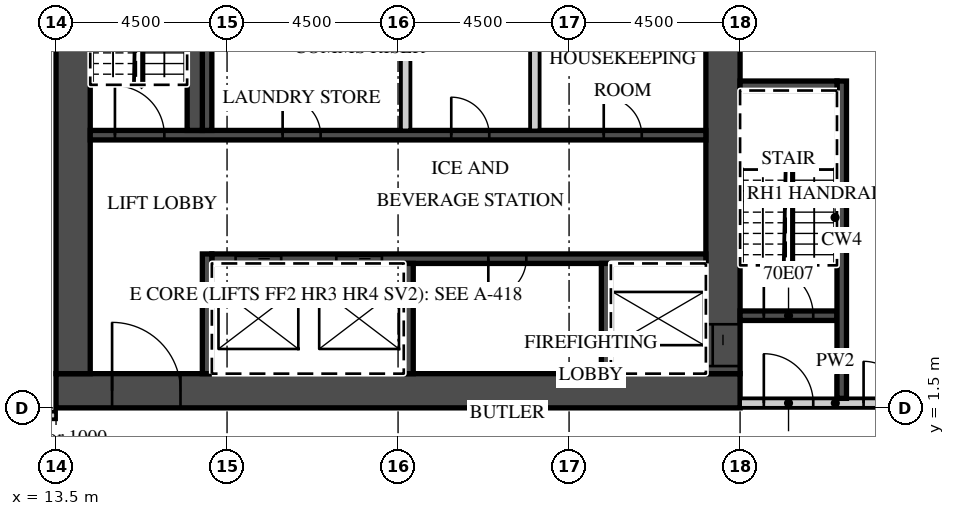
"""IFC4 building model, lengths in metres.
Left out: names, types, materials, properties, quantities, classifications, styles, units other than length and angle.
Written with IfcOpenShell. Run it as: python <this file> out.ifc"""

import sys

from ifc_helpers import new_model, si_unit, direction, frame, frame_2d, origin, place, context, subcontext, project, spatial, rectangle, extrude, element, fill, save


model = new_model("IFC4")
c1 = context("Model", 3, precision=1e-05, world=origin(), true_north=direction((0.0, 1.0)))
c2 = subcontext(c1, "Body", "Model", "MODEL_VIEW")
j1 = project(units=[si_unit("LENGTHUNIT", "METRE"), si_unit("PLANEANGLEUNIT", "RADIAN")], contexts=[c1])
p1 = place(None, origin())
s1 = spatial("IfcSite", under=j1, at=p1, CompositionType="ELEMENT")
p2 = place(p1, origin())
s2 = spatial("IfcBuilding", under=s1, at=p2, CompositionType="ELEMENT")
p3 = place(p2, frame((0.0, 0.0, 281.7)))
s3 = spatial("IfcBuildingStorey", under=s2, at=p3, CompositionType="ELEMENT", Elevation=281.7)
p4 = place(p3, frame((38.132, -12.858, 0.0), z_axis=(0.0, 0.0, 1.0), x_axis=(-0.095847749461, 0.995396006082, 0.0)))
e1 = element("IfcWall", 1, at=p4, inside=s3, PredefinedType="SOLIDWALL", context=c2, shape_type="SweptSolid", body=[
    extrude(rectangle(XDim=32.0, YDim=0.45, at=frame_2d((16.0, 0.0))), origin(), (0.0, 0.0, 1.0), 3.02),
])
p5 = place(p3, frame((-39.909, 1.3, 0.0), z_axis=(0.0, 0.0, 1.0), x_axis=(1.0, 0.0, 0.0)))
e2 = element("IfcWall", 2, at=p5, inside=s3, PredefinedType="PARTITIONING", context=c2, shape_type="SweptSolid", body=[
    extrude(rectangle(XDim=53.409, YDim=0.2, at=frame_2d((26.705, 0.0))), origin(), (0.0, 0.0, 1.0), 3.02),
])
p6 = place(p5, frame((0.15, 0.0, 0.0)))
e3 = element("IfcOpeningElement", 3, at=p6, cuts=e2, PredefinedType="OPENING", context=c2, shape_type="SweptSolid", body=[
    extrude(rectangle(XDim=0.9, YDim=2.1, at=frame_2d((0.45, 1.05))), frame((0.0, 0.11, 0.0), z_axis=(0.0, -1.0, 0.0), x_axis=(1.0, 0.0, 0.0)), (0.0, 0.0, 1.0), 0.22),
])
p7 = place(p5, frame((6.347, 0.0, 0.0)))
e4 = element("IfcOpeningElement", 4, at=p7, cuts=e2, PredefinedType="OPENING", context=c2, shape_type="SweptSolid", body=[
    extrude(rectangle(XDim=1.2, YDim=2.1, at=frame_2d((0.6, 1.05))), frame((0.0, 0.11, 0.0), z_axis=(0.0, -1.0, 0.0), x_axis=(1.0, 0.0, 0.0)), (0.0, 0.0, 1.0), 0.22),
])
p8 = place(p5, frame((15.347, 0.0, 0.0)))
e5 = element("IfcOpeningElement", 5, at=p8, cuts=e2, PredefinedType="OPENING", context=c2, shape_type="SweptSolid", body=[
    extrude(rectangle(XDim=1.2, YDim=2.1, at=frame_2d((0.6, 1.05))), frame((0.0, 0.11, 0.0), z_axis=(0.0, -1.0, 0.0), x_axis=(1.0, 0.0, 0.0)), (0.0, 0.0, 1.0), 0.22),
])
p9 = place(p5, frame((24.346, 0.0, 0.0)))
e6 = element("IfcOpeningElement", 6, at=p9, cuts=e2, PredefinedType="OPENING", context=c2, shape_type="SweptSolid", body=[
    extrude(rectangle(XDim=1.2, YDim=2.1, at=frame_2d((0.6, 1.05))), frame((0.0, 0.11, 0.0), z_axis=(0.0, -1.0, 0.0), x_axis=(1.0, 0.0, 0.0)), (0.0, 0.0, 1.0), 0.22),
])
p10 = place(p5, frame((33.346, 0.0, 0.0)))
e7 = element("IfcOpeningElement", 7, at=p10, cuts=e2, PredefinedType="OPENING", context=c2, shape_type="SweptSolid", body=[
    extrude(rectangle(XDim=1.2, YDim=2.1, at=frame_2d((0.6, 1.05))), frame((0.0, 0.11, 0.0), z_axis=(0.0, -1.0, 0.0), x_axis=(1.0, 0.0, 0.0)), (0.0, 0.0, 1.0), 0.22),
])
p11 = place(p5, frame((42.346, 0.0, 0.0)))
e8 = element("IfcOpeningElement", 8, at=p11, cuts=e2, PredefinedType="OPENING", context=c2, shape_type="SweptSolid", body=[
    extrude(rectangle(XDim=1.2, YDim=2.1, at=frame_2d((0.6, 1.05))), frame((0.0, 0.11, 0.0), z_axis=(0.0, -1.0, 0.0), x_axis=(1.0, 0.0, 0.0)), (0.0, 0.0, 1.0), 0.22),
])
p12 = place(p5, frame((51.834, 0.0, 0.0)))
e9 = element("IfcOpeningElement", 9, at=p12, cuts=e2, PredefinedType="OPENING", context=c2, shape_type="SweptSolid", body=[
    extrude(rectangle(XDim=1.0, YDim=2.1, at=frame_2d((0.5, 1.05))), frame((0.0, 0.11, 0.0), z_axis=(0.0, -1.0, 0.0), x_axis=(1.0, 0.0, 0.0)), (0.0, 0.0, 1.0), 0.22),
])
p13 = place(p3, frame((13.5, 1.95, 0.0), z_axis=(0.0, 0.0, 1.0), x_axis=(1.0, 0.0, 0.0)))
e10 = element("IfcWall", 10, at=p13, inside=s3, PredefinedType="SHEAR", context=c2, shape_type="SweptSolid", body=[
    extrude(rectangle(XDim=18.0, YDim=0.9, at=frame_2d((9.0, 0.0))), origin(), (0.0, 0.0, 1.0), 3.02),
])
p14 = place(p13, frame((1.475, 0.0, 0.0)))
e11 = element("IfcOpeningElement", 11, at=p14, cuts=e10, PredefinedType="OPENING", context=c2, shape_type="SweptSolid", body=[
    extrude(rectangle(XDim=1.8, YDim=2.1, at=frame_2d((0.9, 1.05))), frame((0.0, 0.46, 0.0), z_axis=(0.0, -1.0, 0.0), x_axis=(1.0, 0.0, 0.0)), (0.0, 0.0, 1.0), 0.92),
])
p15 = place(p3, frame((31.05, 2.4, 0.0), z_axis=(0.0, 0.0, 1.0), x_axis=(0.0, 1.0, 0.0)))
e12 = element("IfcWall", 12, at=p15, inside=s3, PredefinedType="SHEAR", context=c2, shape_type="SweptSolid", body=[
    extrude(rectangle(XDim=12.8, YDim=0.9, at=frame_2d((6.4, 0.0))), origin(), (0.0, 0.0, 1.0), 3.02),
])
p16 = place(p15, frame((0.2, 0.0, 0.0)))
e13 = element("IfcOpeningElement", 13, at=p16, cuts=e12, PredefinedType="OPENING", context=c2, shape_type="SweptSolid", body=[
    extrude(rectangle(XDim=1.1, YDim=2.1, at=frame_2d((0.55, 1.05))), frame((0.0, 0.46, 0.0), z_axis=(0.0, -1.0, 0.0), x_axis=(1.0, 0.0, 0.0)), (0.0, 0.0, 1.0), 0.92),
])
p17 = place(p3, frame((13.95, 2.4, 0.0), z_axis=(0.0, 0.0, 1.0), x_axis=(0.0, 1.0, 0.0)))
e14 = element("IfcWall", 14, at=p17, inside=s3, PredefinedType="SHEAR", context=c2, shape_type="SweptSolid", body=[
    extrude(rectangle(XDim=12.2, YDim=0.9, at=frame_2d((6.1, 0.0))), origin(), (0.0, 0.0, 1.0), 3.02),
])
p18 = place(p3, frame((17.6, 5.425, 0.0), z_axis=(0.0, 0.0, 1.0), x_axis=(1.0, 0.0, 0.0)))
e15 = element("IfcWall", 15, at=p18, inside=s3, PredefinedType="SHEAR", context=c2, shape_type="SweptSolid", body=[
    extrude(rectangle(XDim=13.0, YDim=0.25, at=frame_2d((6.5, 0.0))), origin(), (0.0, 0.0, 1.0), 3.02),
])
p19 = place(p18, frame((3.275, 0.0, 0.0)))
e16 = element("IfcOpeningElement", 16, at=p19, cuts=e15, PredefinedType="OPENING", context=c2, shape_type="SweptSolid", body=[
    extrude(rectangle(XDim=1.2, YDim=2.1, at=frame_2d((0.6, 1.05))), frame((0.0, 0.135, 0.0), z_axis=(0.0, -1.0, 0.0), x_axis=(1.0, 0.0, 0.0)), (0.0, 0.0, 1.0), 0.27),
])
p20 = place(p18, frame((0.625, 0.0, 0.0)))
e17 = element("IfcOpeningElement", 17, at=p20, cuts=e15, PredefinedType="OPENING", context=c2, shape_type="SweptSolid", body=[
    extrude(rectangle(XDim=1.2, YDim=2.1, at=frame_2d((0.6, 1.05))), frame((0.0, 0.135, 0.0), z_axis=(0.0, -1.0, 0.0), x_axis=(1.0, 0.0, 0.0)), (0.0, 0.0, 1.0), 0.27),
])
p21 = place(p18, frame((7.275, 0.0, 0.0)))
e18 = element("IfcOpeningElement", 18, at=p21, cuts=e15, PredefinedType="OPENING", context=c2, shape_type="SweptSolid", body=[
    extrude(rectangle(XDim=1.0, YDim=2.1, at=frame_2d((0.5, 1.05))), frame((0.0, 0.135, 0.0), z_axis=(0.0, -1.0, 0.0), x_axis=(1.0, 0.0, 0.0)), (0.0, 0.0, 1.0), 0.27),
])
p22 = place(p3, frame((17.475, 2.4, 0.0), z_axis=(0.0, 0.0, 1.0), x_axis=(0.0, 1.0, 0.0)))
e19 = element("IfcWall", 19, at=p22, inside=s3, PredefinedType="SHEAR", context=c2, shape_type="SweptSolid", body=[
    extrude(rectangle(XDim=3.15, YDim=0.25, at=frame_2d((1.575, 0.0))), origin(), (0.0, 0.0, 1.0), 3.02),
])
for number, where, z_axis, x_axis in (
    (20, (27.975, 2.4, 0.0), (0.0, 0.0, 1.0), (0.0, 1.0, 0.0)),
    (21, (22.775, 2.4, 0.0), (0.0, 0.0, 1.0), (0.0, 1.0, 0.0)),
):
    element("IfcWall", number, at=place(p3, frame(where, z_axis=z_axis, x_axis=x_axis)), inside=s3, PredefinedType="SHEAR", context=c2, shape_type="SweptSolid", body=[
        extrude(rectangle(XDim=2.9, YDim=0.25, at=frame_2d((1.45, 0.0))), origin(), (0.0, 0.0, 1.0), 3.02),
    ])
p23 = place(p3, frame((14.4, 8.675, 0.0), z_axis=(0.0, 0.0, 1.0), x_axis=(1.0, 0.0, 0.0)))
e22 = element("IfcWall", 22, at=p23, inside=s3, PredefinedType="SHEAR", context=c2, shape_type="SweptSolid", body=[
    extrude(rectangle(XDim=16.2, YDim=0.25, at=frame_2d((8.1, 0.0))), origin(), (0.0, 0.0, 1.0), 3.02),
])
p24 = place(p23, frame((0.65, 0.0, 0.0)))
e23 = element("IfcOpeningElement", 23, at=p24, cuts=e22, PredefinedType="OPENING", context=c2, shape_type="SweptSolid", body=[
    extrude(rectangle(XDim=1.3, YDim=2.1, at=frame_2d((0.65, 1.05))), frame((0.0, 0.135, 0.0), z_axis=(0.0, -1.0, 0.0), x_axis=(1.0, 0.0, 0.0)), (0.0, 0.0, 1.0), 0.27),
])
p25 = place(p23, frame((13.512, 0.0, 0.0)))
e24 = element("IfcOpeningElement", 24, at=p25, cuts=e22, PredefinedType="OPENING", context=c2, shape_type="SweptSolid", body=[
    extrude(rectangle(XDim=1.0, YDim=2.1, at=frame_2d((0.5, 1.05))), frame((0.0, 0.135, 0.0), z_axis=(0.0, -1.0, 0.0), x_axis=(1.0, 0.0, 0.0)), (0.0, 0.0, 1.0), 0.27),
])
p26 = place(p23, frame((9.5, 0.0, 0.0)))
e25 = element("IfcOpeningElement", 25, at=p26, cuts=e22, PredefinedType="OPENING", context=c2, shape_type="SweptSolid", body=[
    extrude(rectangle(XDim=1.0, YDim=2.1, at=frame_2d((0.5, 1.05))), frame((0.0, 0.135, 0.0), z_axis=(0.0, -1.0, 0.0), x_axis=(1.0, 0.0, 0.0)), (0.0, 0.0, 1.0), 0.27),
])
p27 = place(p23, frame((5.062, 0.0, 0.0)))
e26 = element("IfcOpeningElement", 26, at=p27, cuts=e22, PredefinedType="OPENING", context=c2, shape_type="SweptSolid", body=[
    extrude(rectangle(XDim=1.0, YDim=2.1, at=frame_2d((0.5, 1.05))), frame((0.0, 0.135, 0.0), z_axis=(0.0, -1.0, 0.0), x_axis=(1.0, 0.0, 0.0)), (0.0, 0.0, 1.0), 0.27),
])
p28 = place(p3, frame((17.475, 8.8, 0.0), z_axis=(0.0, 0.0, 1.0), x_axis=(0.0, 1.0, 0.0)))
e27 = element("IfcWall", 27, at=p28, inside=s3, PredefinedType="SHEAR", context=c2, shape_type="SweptSolid", body=[
    extrude(rectangle(XDim=2.9, YDim=0.25, at=frame_2d((1.45, 0.0))), origin(), (0.0, 0.0, 1.0), 3.02),
])
for number, where, z_axis, x_axis in (
    (28, (26.1, 8.8, 0.0), (0.0, 0.0, 1.0), (0.0, 1.0, 0.0)),
    (29, (22.7, 8.8, 0.0), (0.0, 0.0, 1.0), (0.0, 1.0, 0.0)),
):
    element("IfcWall", number, at=place(p3, frame(where, z_axis=z_axis, x_axis=x_axis)), inside=s3, PredefinedType="PARTITIONING", context=c2, shape_type="SweptSolid", body=[
        extrude(rectangle(XDim=2.9, YDim=0.25, at=frame_2d((1.45, 0.0))), origin(), (0.0, 0.0, 1.0), 3.02),
    ])
p29 = place(p3, frame((17.15, 8.8, 0.0), z_axis=(0.0, 0.0, 1.0), x_axis=(0.0, 1.0, 0.0)))
e30 = element("IfcWall", 30, at=p29, inside=s3, PredefinedType="SHEAR", context=c2, shape_type="SweptSolid", body=[
    extrude(rectangle(XDim=5.8, YDim=0.4, at=frame_2d((2.9, 0.0))), origin(), (0.0, 0.0, 1.0), 3.02),
])
p30 = place(p3, frame((31.5, 1.625, 0.0), z_axis=(0.0, 0.0, 1.0), x_axis=(1.0, 0.0, 0.0)))
e31 = element("IfcWall", 31, at=p30, inside=s3, PredefinedType="PARTITIONING", context=c2, shape_type="SweptSolid", body=[
    extrude(rectangle(XDim=5.012, YDim=0.25, at=frame_2d((2.506, 0.0))), origin(), (0.0, 0.0, 1.0), 3.02),
])
p31 = place(p30, frame((0.625, 0.0, 0.0)))
e32 = element("IfcOpeningElement", 32, at=p31, cuts=e31, PredefinedType="OPENING", context=c2, shape_type="SweptSolid", body=[
    extrude(rectangle(XDim=1.3, YDim=2.1, at=frame_2d((0.65, 1.05))), frame((0.0, 0.135, 0.0), z_axis=(0.0, -1.0, 0.0), x_axis=(1.0, 0.0, 0.0)), (0.0, 0.0, 1.0), 0.27),
])
p32 = place(p30, frame((3.25, 0.0, 0.0)))
e33 = element("IfcOpeningElement", 33, at=p32, cuts=e31, PredefinedType="OPENING", context=c2, shape_type="SweptSolid", body=[
    extrude(rectangle(XDim=1.1, YDim=2.1, at=frame_2d((0.55, 1.05))), frame((0.0, 0.135, 0.0), z_axis=(0.0, -1.0, 0.0), x_axis=(1.0, 0.0, 0.0)), (0.0, 0.0, 1.0), 0.27),
])
p33 = place(p3, frame((31.5, 3.925, 0.0), z_axis=(0.0, 0.0, 1.0), x_axis=(1.0, 0.0, 0.0)))
e34 = element("IfcWall", 34, at=p33, inside=s3, PredefinedType="SHEAR", context=c2, shape_type="SweptSolid", body=[
    extrude(rectangle(XDim=2.55, YDim=0.25, at=frame_2d((1.275, 0.0))), origin(), (0.0, 0.0, 1.0), 3.02),
])
p34 = place(p33, frame((0.625, 0.0, 0.0)))
e35 = element("IfcOpeningElement", 35, at=p34, cuts=e34, PredefinedType="OPENING", context=c2, shape_type="SweptSolid", body=[
    extrude(rectangle(XDim=1.3, YDim=2.1, at=frame_2d((0.65, 1.05))), frame((0.0, 0.135, 0.0), z_axis=(0.0, -1.0, 0.0), x_axis=(1.0, 0.0, 0.0)), (0.0, 0.0, 1.0), 0.27),
])
p35 = place(p3, frame((34.175, 1.75, 0.0), z_axis=(0.0, 0.0, 1.0), x_axis=(0.0, 1.0, 0.0)))
e36 = element("IfcWall", 36, at=p35, inside=s3, PredefinedType="SHEAR", context=c2, shape_type="SweptSolid", body=[
    extrude(rectangle(XDim=8.35, YDim=0.25, at=frame_2d((4.175, 0.0))), origin(), (0.0, 0.0, 1.0), 3.02),
])
p36 = place(p3, frame((31.5, 9.975, 0.0), z_axis=(0.0, 0.0, 1.0), x_axis=(1.0, 0.0, 0.0)))
e37 = element("IfcWall", 37, at=p36, inside=s3, PredefinedType="SHEAR", context=c2, shape_type="SweptSolid", body=[
    extrude(rectangle(XDim=2.55, YDim=0.25, at=frame_2d((1.275, 0.0))), origin(), (0.0, 0.0, 1.0), 3.02),
])
p37 = place(p19, origin())
e38 = element("IfcDoor", 38, at=p37, inside=s3, OperationType="SLIDING_TO_RIGHT", PredefinedType="DOOR", context=c2, shape_type="SweptSolid", body=[
    extrude(rectangle(XDim=1.2, YDim=2.1, at=frame_2d((0.6, 1.05))), frame((0.0, 0.025, 0.0), z_axis=(0.0, -1.0, 0.0), x_axis=(1.0, 0.0, 0.0)), (0.0, 0.0, 1.0), 0.05),
])
fill(e16, e38)
p38 = place(p20, origin())
e39 = element("IfcDoor", 39, at=p38, inside=s3, OperationType="SLIDING_TO_LEFT", PredefinedType="DOOR", context=c2, shape_type="SweptSolid", body=[
    extrude(rectangle(XDim=1.2, YDim=2.1, at=frame_2d((0.6, 1.05))), frame((0.0, 0.025, 0.0), z_axis=(0.0, -1.0, 0.0), x_axis=(1.0, 0.0, 0.0)), (0.0, 0.0, 1.0), 0.05),
])
fill(e17, e39)
p39 = place(p16, origin())
e40 = element("IfcDoor", 40, at=p39, inside=s3, OperationType="SLIDING_TO_LEFT", PredefinedType="DOOR", context=c2, shape_type="SweptSolid", body=[
    extrude(rectangle(XDim=1.1, YDim=2.1, at=frame_2d((0.55, 1.05))), frame((0.0, 0.025, 0.0), z_axis=(0.0, -1.0, 0.0), x_axis=(1.0, 0.0, 0.0)), (0.0, 0.0, 1.0), 0.05),
])
fill(e13, e40)
p40 = place(p14, origin())
e41 = element("IfcDoor", 41, at=p40, inside=s3, OperationType="DOUBLE_DOOR_DOUBLE_SWING", PredefinedType="DOOR", context=c2, shape_type="SweptSolid", body=[
    extrude(rectangle(XDim=1.8, YDim=2.1, at=frame_2d((0.9, 1.05))), frame((0.0, 0.025, 0.0), z_axis=(0.0, -1.0, 0.0), x_axis=(1.0, 0.0, 0.0)), (0.0, 0.0, 1.0), 0.05),
])
fill(e11, e41)
p41 = place(p31, origin())
e42 = element("IfcDoor", 42, at=p41, inside=s3, OperationType="SINGLE_SWING_LEFT", PredefinedType="DOOR", context=c2, shape_type="SweptSolid", body=[
    extrude(rectangle(XDim=1.3, YDim=2.1, at=frame_2d((0.65, 1.05))), frame((0.0, 0.025, 0.0), z_axis=(0.0, -1.0, 0.0), x_axis=(1.0, 0.0, 0.0)), (0.0, 0.0, 1.0), 0.05),
])
fill(e32, e42)
p42 = place(p34, origin())
e43 = element("IfcDoor", 43, at=p42, inside=s3, OperationType="SINGLE_SWING_LEFT", PredefinedType="DOOR", context=c2, shape_type="SweptSolid", body=[
    extrude(rectangle(XDim=1.3, YDim=2.1, at=frame_2d((0.65, 1.05))), frame((0.0, 0.025, 0.0), z_axis=(0.0, -1.0, 0.0), x_axis=(1.0, 0.0, 0.0)), (0.0, 0.0, 1.0), 0.05),
])
fill(e35, e43)
p43 = place(p32, origin())
e44 = element("IfcDoor", 44, at=p43, inside=s3, OperationType="SINGLE_SWING_LEFT", PredefinedType="DOOR", context=c2, shape_type="SweptSolid", body=[
    extrude(rectangle(XDim=1.1, YDim=2.1, at=frame_2d((0.55, 1.05))), frame((0.0, 0.025, 0.0), z_axis=(0.0, -1.0, 0.0), x_axis=(1.0, 0.0, 0.0)), (0.0, 0.0, 1.0), 0.05),
])
fill(e33, e44)
p44 = place(p24, origin())
e45 = element("IfcDoor", 45, at=p44, inside=s3, OperationType="SINGLE_SWING_LEFT", PredefinedType="DOOR", context=c2, shape_type="SweptSolid", body=[
    extrude(rectangle(XDim=1.3, YDim=2.1, at=frame_2d((0.65, 1.05))), frame((0.0, 0.025, 0.0), z_axis=(0.0, -1.0, 0.0), x_axis=(1.0, 0.0, 0.0)), (0.0, 0.0, 1.0), 0.05),
])
fill(e23, e45)
p45 = place(p25, origin())
e46 = element("IfcDoor", 46, at=p45, inside=s3, OperationType="SINGLE_SWING_LEFT", PredefinedType="DOOR", context=c2, shape_type="SweptSolid", body=[
    extrude(rectangle(XDim=1.0, YDim=2.1, at=frame_2d((0.5, 1.05))), frame((0.0, 0.025, 0.0), z_axis=(0.0, -1.0, 0.0), x_axis=(1.0, 0.0, 0.0)), (0.0, 0.0, 1.0), 0.05),
])
fill(e24, e46)
p46 = place(p26, origin())
e47 = element("IfcDoor", 47, at=p46, inside=s3, OperationType="SINGLE_SWING_LEFT", PredefinedType="DOOR", context=c2, shape_type="SweptSolid", body=[
    extrude(rectangle(XDim=1.0, YDim=2.1, at=frame_2d((0.5, 1.05))), frame((0.0, 0.025, 0.0), z_axis=(0.0, -1.0, 0.0), x_axis=(1.0, 0.0, 0.0)), (0.0, 0.0, 1.0), 0.05),
])
fill(e25, e47)
p47 = place(p27, origin())
e48 = element("IfcDoor", 48, at=p47, inside=s3, OperationType="SINGLE_SWING_LEFT", PredefinedType="DOOR", context=c2, shape_type="SweptSolid", body=[
    extrude(rectangle(XDim=1.0, YDim=2.1, at=frame_2d((0.5, 1.05))), frame((0.0, 0.025, 0.0), z_axis=(0.0, -1.0, 0.0), x_axis=(1.0, 0.0, 0.0)), (0.0, 0.0, 1.0), 0.05),
])
fill(e26, e48)
p48 = place(p21, origin())
e49 = element("IfcDoor", 49, at=p48, inside=s3, OperationType="SINGLE_SWING_LEFT", PredefinedType="DOOR", context=c2, shape_type="SweptSolid", body=[
    extrude(rectangle(XDim=1.0, YDim=2.1, at=frame_2d((0.5, 1.05))), frame((0.0, 0.025, 0.0), z_axis=(0.0, -1.0, 0.0), x_axis=(1.0, 0.0, 0.0)), (0.0, 0.0, 1.0), 0.05),
])
fill(e18, e49)
save(model, sys.argv[1])
